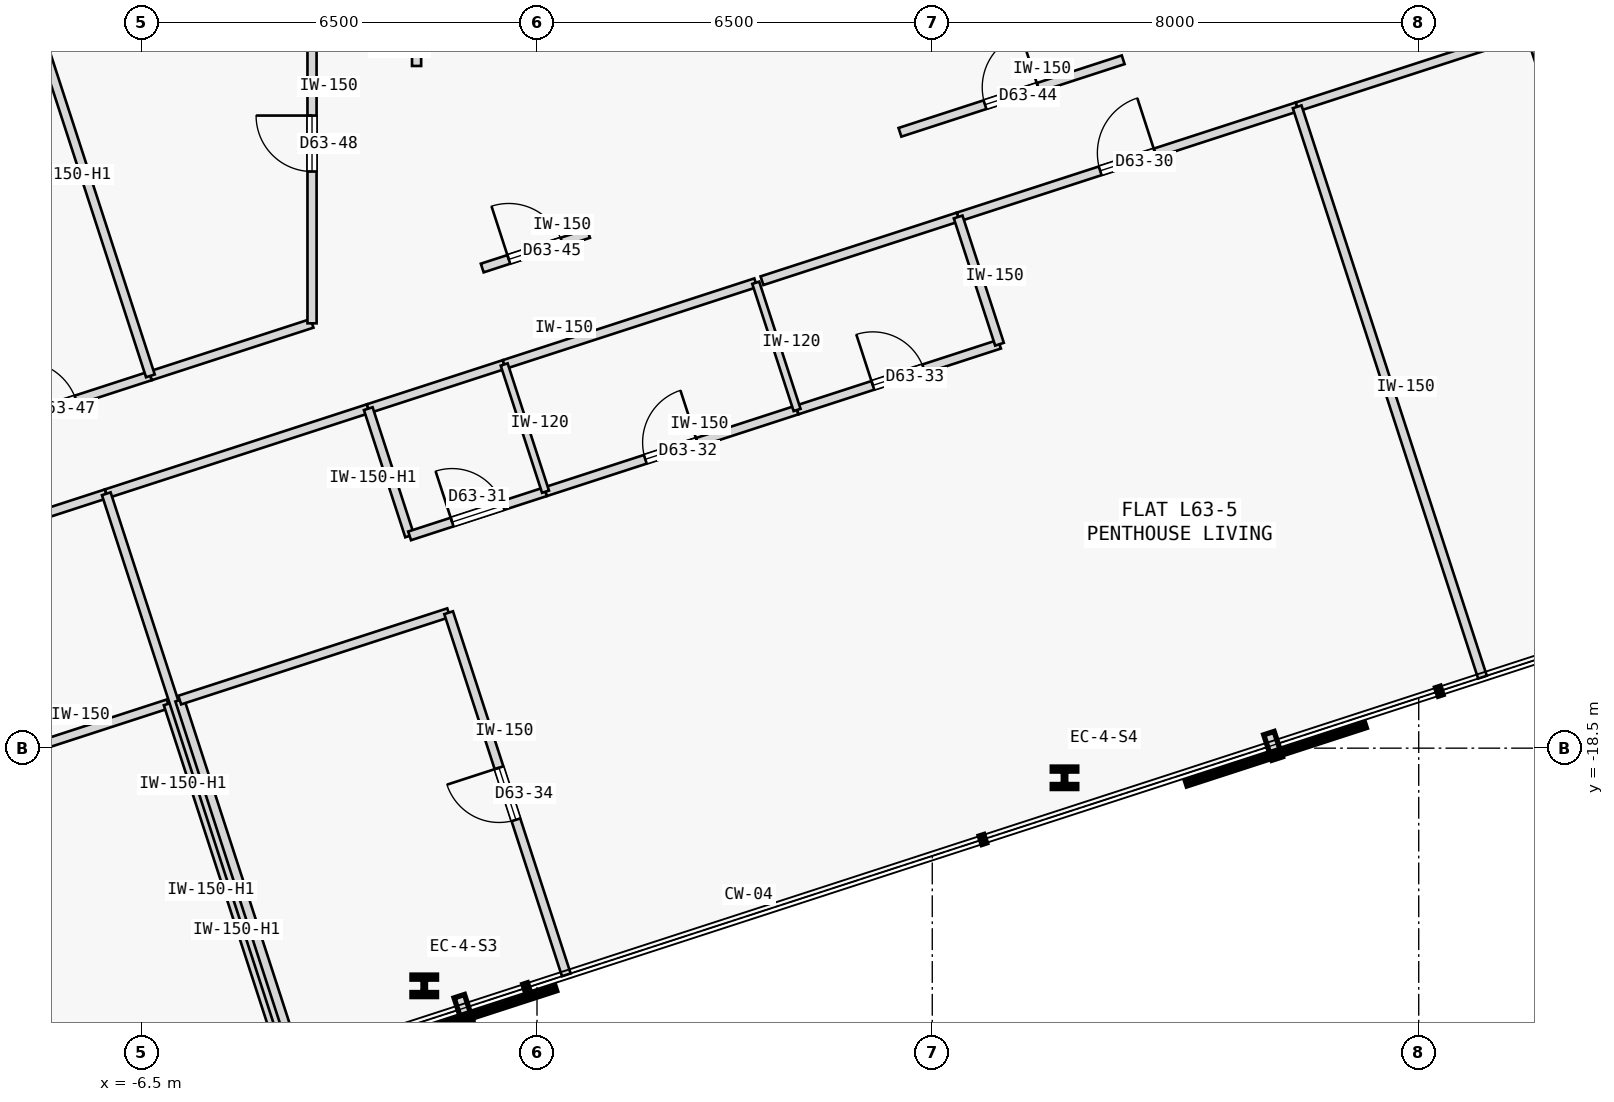
"""IFC4 building model, lengths in metres.
Left out: names, types, materials, properties, quantities, classifications, styles, units other than length and angle.
Written with IfcOpenShell. Run it as: python <this file> out.ifc"""

import sys

from ifc_helpers import new_model, si_unit, direction, frame, frame_2d, origin, origin_2d, place, context, subcontext, project, spatial, rectangle, i_section, extrude, element, fill, save


model = new_model("IFC4")
c1 = context("Model", 3, precision=1e-05, world=origin(), true_north=direction((0.0, 1.0)))
c2 = subcontext(c1, "Body", "Model", "MODEL_VIEW")
j1 = project(units=[si_unit("LENGTHUNIT", "METRE"), si_unit("PLANEANGLEUNIT", "RADIAN")], contexts=[c1])
p1 = place(None, origin())
s1 = spatial("IfcSite", under=j1, at=p1, CompositionType="ELEMENT")
p2 = place(p1, origin())
s2 = spatial("IfcBuilding", under=s1, at=p2, CompositionType="ELEMENT")
p3 = place(p2, frame((0.0, 0.0, 237.7)))
s3 = spatial("IfcBuildingStorey", under=s2, at=p3, CompositionType="ELEMENT", Elevation=237.7)
for number, where, z_axis, x_axis in (
    (1, (-1.854, -22.409, 0.0), (0.0, 0.0, 1.0), (1.0, 0.0, 0.0)),
    (2, (8.675, -18.988, 0.0), (0.0, 0.0, 1.0), (1.0, 0.0, 0.0)),
):
    element("IfcColumn", number, at=place(p3, frame(where, z_axis=z_axis, x_axis=x_axis)), inside=s3, PredefinedType="COLUMN", context=c2, shape_type="SweptSolid", body=[
        extrude(i_section(OverallWidth=0.405, OverallDepth=0.355, WebThickness=0.042, FlangeThickness=0.068, FilletRadius=0.015, at=origin_2d()), origin(), (0.0, 0.0, 1.0), 3.35),
    ])
p4 = place(p3, frame((-14.349, -16.677, 0.0), z_axis=(0.0, 0.0, 1.0), x_axis=(0.951058958043, 0.309009479345, 0.0)))
e3 = element("IfcWall", 3, at=p4, inside=s3, PredefinedType="PARTITIONING", context=c2, shape_type="SweptSolid", body=[
    extrude(rectangle(XDim=7.64, YDim=0.15, at=frame_2d((3.82, 0.0))), origin(), (0.0, 0.0, 1.0), 3.125),
])
p5 = place(p4, frame((3.345, 0.0, 0.0)))
e4 = element("IfcOpeningElement", 4, at=p5, cuts=e3, PredefinedType="OPENING", context=c2, shape_type="SweptSolid", body=[
    extrude(rectangle(XDim=0.95, YDim=2.15, at=frame_2d((0.475, 1.075))), frame((0.0, 0.085, 0.0), z_axis=(0.0, -1.0, 0.0), x_axis=(1.0, 0.0, 0.0)), (0.0, 0.0, 1.0), 0.17),
])
p6 = place(p3, frame((-7.083, -14.316, 0.0), z_axis=(0.0, 0.0, 1.0), x_axis=(0.951054265246, 0.309023922305, 0.0)))
e5 = element("IfcWall", 5, at=p6, inside=s3, PredefinedType="PARTITIONING", context=c2, shape_type="SweptSolid", body=[
    extrude(rectangle(XDim=4.53, YDim=0.15, at=frame_2d((2.265, 0.0))), origin(), (0.0, 0.0, 1.0), 3.125),
])
p7 = place(p3, frame((6.926, -9.765, 0.0), z_axis=(0.0, 0.0, 1.0), x_axis=(0.951054878391, 0.30902203528, 0.0)))
e6 = element("IfcWall", 6, at=p7, inside=s3, PredefinedType="PARTITIONING", context=c2, shape_type="SweptSolid", body=[
    extrude(rectangle(XDim=5.862, YDim=0.15, at=frame_2d((2.931, 0.0))), origin(), (0.0, 0.0, 1.0), 3.125),
])
p8 = place(p7, frame((2.456, 0.0, 0.0)))
e7 = element("IfcOpeningElement", 7, at=p8, cuts=e6, PredefinedType="OPENING", context=c2, shape_type="SweptSolid", body=[
    extrude(rectangle(XDim=0.95, YDim=2.15, at=frame_2d((0.475, 1.075))), frame((0.0, 0.085, 0.0), z_axis=(0.0, -1.0, 0.0), x_axis=(1.0, 0.0, 0.0)), (0.0, 0.0, 1.0), 0.17),
])
p9 = place(p3, frame((-2.775, -12.917, 0.0), z_axis=(0.0, 0.0, 1.0), x_axis=(0.951066131077, 0.308987401554, 0.0)))
e8 = element("IfcWall", 8, at=p9, inside=s3, PredefinedType="PARTITIONING", context=c2, shape_type="SweptSolid", body=[
    extrude(rectangle(XDim=2.35, YDim=0.15, at=frame_2d((1.175, 0.0))), origin(), (0.0, 0.0, 1.0), 3.125),
])
p10 = place(p3, frame((-0.54, -12.19, 0.0), z_axis=(0.0, 0.0, 1.0), x_axis=(0.951057987102, 0.309012467661, 0.0)))
e9 = element("IfcWall", 9, at=p10, inside=s3, PredefinedType="PARTITIONING", context=c2, shape_type="SweptSolid", body=[
    extrude(rectangle(XDim=4.35, YDim=0.15, at=frame_2d((2.175, 0.0))), origin(), (0.0, 0.0, 1.0), 3.125),
])
p11 = place(p3, frame((3.7, -10.813, 0.0), z_axis=(0.0, 0.0, 1.0), x_axis=(0.95106685659, 0.308985168408, 0.0)))
e10 = element("IfcWall", 10, at=p11, inside=s3, PredefinedType="PARTITIONING", context=c2, shape_type="SweptSolid", body=[
    extrude(rectangle(XDim=3.392, YDim=0.15, at=frame_2d((1.696, 0.0))), origin(), (0.0, 0.0, 1.0), 3.125),
])
p12 = place(p3, frame((12.501, -7.953, 0.0), z_axis=(0.0, 0.0, 1.0), x_axis=(0.951046103464, 0.309049039936, 0.0)))
e11 = element("IfcWall", 11, at=p12, inside=s3, PredefinedType="PARTITIONING", context=c2, shape_type="SweptSolid", body=[
    extrude(rectangle(XDim=4.025, YDim=0.15, at=frame_2d((2.012, 0.0))), origin(), (0.0, 0.0, 1.0), 3.125),
])
p13 = place(p3, frame((5.969, -8.372, 0.0), z_axis=(0.0, 0.0, 1.0), x_axis=(0.951053123415, 0.309027436391, 0.0)))
e12 = element("IfcWall", 12, at=p13, inside=s3, PredefinedType="PARTITIONING", context=c2, shape_type="SweptSolid", body=[
    extrude(rectangle(XDim=3.86, YDim=0.15, at=frame_2d((1.93, 0.0))), origin(), (0.0, 0.0, 1.0), 3.125),
])
p14 = place(p13, frame((1.47, 0.0, 0.0)))
e13 = element("IfcOpeningElement", 13, at=p14, cuts=e12, PredefinedType="OPENING", context=c2, shape_type="SweptSolid", body=[
    extrude(rectangle(XDim=0.92, YDim=2.15, at=frame_2d((0.46, 1.075))), frame((0.0, 0.085, 0.0), z_axis=(0.0, -1.0, 0.0), x_axis=(1.0, 0.0, 0.0)), (0.0, 0.0, 1.0), 0.17),
])
p15 = place(p3, frame((-0.901, -10.604, 0.0), z_axis=(0.0, 0.0, 1.0), x_axis=(0.951085784807, 0.308926900637, 0.0)))
e14 = element("IfcWall", 14, at=p15, inside=s3, PredefinedType="PARTITIONING", context=c2, shape_type="SweptSolid", body=[
    extrude(rectangle(XDim=1.838, YDim=0.15, at=frame_2d((0.919, 0.0))), origin(), (0.0, 0.0, 1.0), 3.125),
])
p16 = place(p15, frame((0.459, 0.0, 0.0)))
e15 = element("IfcOpeningElement", 15, at=p16, cuts=e14, PredefinedType="OPENING", context=c2, shape_type="SweptSolid", body=[
    extrude(rectangle(XDim=0.92, YDim=2.15, at=frame_2d((0.46, 1.075))), frame((0.0, 0.085, 0.0), z_axis=(0.0, -1.0, 0.0), x_axis=(1.0, 0.0, 0.0)), (0.0, 0.0, 1.0), 0.17),
])
p17 = place(p3, frame((-1.98, -7.281, 0.0), z_axis=(0.0, 0.0, 1.0), x_axis=(0.000784313484, 0.999999692426, 0.0)))
e16 = element("IfcWall", 16, at=p17, inside=s3, PredefinedType="PARTITIONING", context=c2, shape_type="SweptSolid", body=[
    extrude(rectangle(XDim=0.623, YDim=0.15, at=frame_2d((0.311, 0.0))), origin(), (0.0, 0.0, 1.0), 3.125),
])
p18 = place(p3, frame((-9.679, -13.457, 0.0), z_axis=(0.0, 0.0, 1.0), x_axis=(0.951054104561, 0.309024416831, 0.0)))
e17 = element("IfcWall", 17, at=p18, inside=s3, PredefinedType="PARTITIONING", context=c2, shape_type="SweptSolid", body=[
    extrude(rectangle(XDim=3.492, YDim=0.15, at=frame_2d((1.746, 0.0))), origin(), (0.0, 0.0, 1.0), 3.125),
])
p19 = place(p18, frame((1.286, 0.0, 0.0)))
e18 = element("IfcOpeningElement", 18, at=p19, cuts=e17, PredefinedType="OPENING", context=c2, shape_type="SweptSolid", body=[
    extrude(rectangle(XDim=0.92, YDim=2.15, at=frame_2d((0.46, 1.075))), frame((0.0, 0.085, 0.0), z_axis=(0.0, -1.0, 0.0), x_axis=(1.0, 0.0, 0.0)), (0.0, 0.0, 1.0), 0.17),
])
p20 = place(p3, frame((-6.358, -12.377, 0.0), z_axis=(0.0, 0.0, 1.0), x_axis=(0.951049473261, 0.309038669765, 0.0)))
e19 = element("IfcWall", 19, at=p20, inside=s3, PredefinedType="PARTITIONING", context=c2, shape_type="SweptSolid", body=[
    extrude(rectangle(XDim=2.795, YDim=0.15, at=frame_2d((1.397, 0.0))), origin(), (0.0, 0.0, 1.0), 3.125),
])
p21 = place(p3, frame((-3.7, -11.514, 0.0), z_axis=(0.0, 0.0, 1.0), x_axis=(-8.2572974e-05, 0.999999996591, 0.0)))
e20 = element("IfcWall", 20, at=p21, inside=s3, PredefinedType="PARTITIONING", context=c2, shape_type="SweptSolid", body=[
    extrude(rectangle(XDim=5.913, YDim=0.15, at=frame_2d((2.957, 0.0))), origin(), (0.0, 0.0, 1.0), 3.125),
])
p22 = place(p21, frame((2.497, 0.0, 0.0)))
e21 = element("IfcOpeningElement", 21, at=p22, cuts=e20, PredefinedType="OPENING", context=c2, shape_type="SweptSolid", body=[
    extrude(rectangle(XDim=0.92, YDim=2.15, at=frame_2d((0.46, 1.075))), frame((0.0, 0.085, 0.0), z_axis=(0.0, -1.0, 0.0), x_axis=(1.0, 0.0, 0.0)), (0.0, 0.0, 1.0), 0.17),
])
p23 = place(p3, frame((-10.488, -19.208, 0.0), z_axis=(0.0, 0.0, 1.0), x_axis=(0.951050272606, 0.309036209813, 0.0)))
e22 = element("IfcWall", 22, at=p23, inside=s3, PredefinedType="PARTITIONING", context=c2, shape_type="SweptSolid", body=[
    extrude(rectangle(XDim=4.65, YDim=0.15, at=frame_2d((2.325, 0.0))), origin(), (0.0, 0.0, 1.0), 3.125),
])
p24 = place(p3, frame((-4.131, -23.727, 0.0), z_axis=(0.0, 0.0, 1.0), x_axis=(-0.309013782848, 0.951057559777, 0.0)))
e23 = element("IfcWall", 23, at=p24, inside=s3, PredefinedType="PARTITIONING", context=c2, shape_type="SweptSolid", body=[
    extrude(rectangle(XDim=6.262, YDim=0.15, at=frame_2d((3.131, 0.0))), origin(), (0.0, 0.0, 1.0), 2.675),
])
p25 = place(p3, frame((-4.036, -23.696, 0.0), z_axis=(0.0, 0.0, 1.0), x_axis=(-0.309022258842, 0.95105480575, 0.0)))
e24 = element("IfcWall", 24, at=p25, inside=s3, PredefinedType="PARTITIONING", context=c2, shape_type="SweptSolid", body=[
    extrude(rectangle(XDim=9.862, YDim=0.15, at=frame_2d((4.931, 0.0))), origin(), (0.0, 0.0, 1.0), 2.675),
])
p26 = place(p3, frame((-2.095, -15.009, 0.0), z_axis=(0.0, 0.0, 1.0), x_axis=(-0.308960600764, 0.951074837842, 0.0)))
e25 = element("IfcWall", 25, at=p26, inside=s3, PredefinedType="PARTITIONING", context=c2, shape_type="SweptSolid", body=[
    extrude(rectangle(XDim=2.2, YDim=0.15, at=frame_2d((1.1, 0.0))), origin(), (0.0, 0.0, 1.0), 2.675),
])
p27 = place(p3, frame((-2.095, -15.009, 0.0), z_axis=(0.0, 0.0, 1.0), x_axis=(0.951076048914, 0.308956872689, 0.0)))
e26 = element("IfcWall", 26, at=p27, inside=s3, PredefinedType="PARTITIONING", context=c2, shape_type="SweptSolid", body=[
    extrude(rectangle(XDim=2.35, YDim=0.15, at=frame_2d((1.175, 0.0))), origin(), (0.0, 0.0, 1.0), 3.125),
])
p28 = place(p27, frame((0.735, 0.0, 0.0)))
e27 = element("IfcOpeningElement", 27, at=p28, cuts=e26, PredefinedType="OPENING", context=c2, shape_type="SweptSolid", body=[
    extrude(rectangle(XDim=0.88, YDim=2.15, at=frame_2d((0.44, 1.075))), frame((0.0, 0.085, 0.0), z_axis=(0.0, -1.0, 0.0), x_axis=(1.0, 0.0, 0.0)), (0.0, 0.0, 1.0), 0.17),
])
p29 = place(p3, frame((0.14, -14.283, 0.0), z_axis=(0.0, 0.0, 1.0), x_axis=(0.951057987102, 0.309012467661, 0.0)))
e28 = element("IfcWall", 28, at=p29, inside=s3, PredefinedType="PARTITIONING", context=c2, shape_type="SweptSolid", body=[
    extrude(rectangle(XDim=4.35, YDim=0.15, at=frame_2d((2.175, 0.0))), origin(), (0.0, 0.0, 1.0), 3.125),
])
p30 = place(p29, frame((1.725, 0.0, 0.0)))
e29 = element("IfcOpeningElement", 29, at=p30, cuts=e28, PredefinedType="OPENING", context=c2, shape_type="SweptSolid", body=[
    extrude(rectangle(XDim=0.9, YDim=2.15, at=frame_2d((0.45, 1.075))), frame((0.0, 0.085, 0.0), z_axis=(0.0, -1.0, 0.0), x_axis=(1.0, 0.0, 0.0)), (0.0, 0.0, 1.0), 0.17),
])
p31 = place(p3, frame((4.277, -12.938, 0.0), z_axis=(0.0, 0.0, 1.0), x_axis=(0.951055596592, 0.309019824916, 0.0)))
e30 = element("IfcWall", 30, at=p31, inside=s3, PredefinedType="PARTITIONING", context=c2, shape_type="SweptSolid", body=[
    extrude(rectangle(XDim=3.5, YDim=0.15, at=frame_2d((1.75, 0.0))), origin(), (0.0, 0.0, 1.0), 3.125),
])
p32 = place(p31, frame((1.31, 0.0, 0.0)))
e31 = element("IfcOpeningElement", 31, at=p32, cuts=e30, PredefinedType="OPENING", context=c2, shape_type="SweptSolid", body=[
    extrude(rectangle(XDim=0.88, YDim=2.15, at=frame_2d((0.44, 1.075))), frame((0.0, 0.085, 0.0), z_axis=(0.0, -1.0, 0.0), x_axis=(1.0, 0.0, 0.0)), (0.0, 0.0, 1.0), 0.17),
])
p33 = place(p3, frame((7.606, -11.857, 0.0), z_axis=(0.0, 0.0, 1.0), x_axis=(-0.309060979314, 0.951042223598, 0.0)))
e32 = element("IfcWall", 32, at=p33, inside=s3, PredefinedType="PARTITIONING", context=c2, shape_type="SweptSolid", body=[
    extrude(rectangle(XDim=2.2, YDim=0.15, at=frame_2d((1.1, 0.0))), origin(), (0.0, 0.0, 1.0), 3.125),
])
p34 = place(p3, frame((-3.941, -23.665, 0.0), z_axis=(0.0, 0.0, 1.0), x_axis=(-0.309013782848, 0.951057559777, 0.0)))
e33 = element("IfcWall", 33, at=p34, inside=s3, PredefinedType="PARTITIONING", context=c2, shape_type="SweptSolid", body=[
    extrude(rectangle(XDim=6.262, YDim=0.15, at=frame_2d((3.131, 0.0))), origin(), (0.0, 0.0, 1.0), 2.675),
])
p35 = place(p3, frame((-5.876, -17.709, 0.0), z_axis=(0.0, 0.0, 1.0), x_axis=(0.951065702951, 0.308988719326, 0.0)))
e34 = element("IfcWall", 34, at=p35, inside=s3, PredefinedType="PARTITIONING", context=c2, shape_type="SweptSolid", body=[
    extrude(rectangle(XDim=4.65, YDim=0.15, at=frame_2d((2.325, 0.0))), origin(), (0.0, 0.0, 1.0), 3.125),
])
p36 = place(p3, frame((0.482, -22.228, 0.0), z_axis=(0.0, 0.0, 1.0), x_axis=(-0.30902524124, 0.951053836687, 0.0)))
e35 = element("IfcWall", 35, at=p36, inside=s3, PredefinedType="PARTITIONING", context=c2, shape_type="SweptSolid", body=[
    extrude(rectangle(XDim=6.262, YDim=0.15, at=frame_2d((3.131, 0.0))), origin(), (0.0, 0.0, 1.0), 3.125),
])
p37 = place(p36, frame((2.681, 0.0, 0.0)))
e36 = element("IfcOpeningElement", 36, at=p37, cuts=e35, PredefinedType="OPENING", context=c2, shape_type="SweptSolid", body=[
    extrude(rectangle(XDim=0.9, YDim=2.15, at=frame_2d((0.45, 1.075))), frame((0.0, 0.085, 0.0), z_axis=(0.0, -1.0, 0.0), x_axis=(1.0, 0.0, 0.0)), (0.0, 0.0, 1.0), 0.17),
])
p38 = place(p3, frame((15.548, -17.333, 0.0), z_axis=(0.0, 0.0, 1.0), x_axis=(-0.308999867152, 0.951062081097, 0.0)))
e37 = element("IfcWall", 37, at=p38, inside=s3, PredefinedType="PARTITIONING", context=c2, shape_type="SweptSolid", body=[
    extrude(rectangle(XDim=9.862, YDim=0.15, at=frame_2d((4.931, 0.0))), origin(), (0.0, 0.0, 1.0), 3.125),
])
for number, where, z_axis, x_axis in (
    (38, (0.14, -14.283, 0.0), (0.0, 0.0, 1.0), (-0.309, 0.951, 0.0)),
    (39, (4.277, -12.938, 0.0), (0.0, 0.0, 1.0), (-0.309, 0.951, 0.0)),
):
    element("IfcWall", number, at=place(p3, frame(where, z_axis=z_axis, x_axis=x_axis)), inside=s3, PredefinedType="PARTITIONING", context=c2, shape_type="SweptSolid", body=[
        extrude(rectangle(XDim=2.2, YDim=0.12, at=frame_2d((1.1, 0.0))), origin(), (0.0, 0.0, 1.0), 3.125),
    ])
p39 = place(p3, frame((17.009, -8.802, 0.0), z_axis=(0.0, 0.0, 1.0), x_axis=(-0.309028364152, 0.951052821956, 0.0)))
e40 = element("IfcWall", 40, at=p39, inside=s3, PredefinedType="PARTITIONING", context=c2, shape_type="SweptSolid", body=[
    extrude(rectangle(XDim=2.2, YDim=0.15, at=frame_2d((1.1, 0.0))), origin(), (0.0, 0.0, 1.0), 3.125),
])
p40 = place(p3, frame((-6.358, -12.377, 0.0), z_axis=(0.0, 0.0, 1.0), x_axis=(-0.309024097906, 0.951054208189, 0.0)))
e41 = element("IfcWall", 41, at=p40, inside=s3, PredefinedType="PARTITIONING", context=c2, shape_type="SweptSolid", body=[
    extrude(rectangle(XDim=7.126, YDim=0.15, at=frame_2d((3.563, 0.0))), origin(), (0.0, 0.0, 1.0), 2.675),
])
p41 = place(p8, origin())
e42 = element("IfcDoor", 42, at=p41, inside=s3, OperationType="SINGLE_SWING_RIGHT", PredefinedType="DOOR", context=c2, shape_type="SweptSolid", body=[
    extrude(rectangle(XDim=0.95, YDim=2.15, at=frame_2d((0.475, 1.075))), frame((0.0, 0.025, 0.0), z_axis=(0.0, -1.0, 0.0), x_axis=(1.0, 0.0, 0.0)), (0.0, 0.0, 1.0), 0.05),
])
fill(e7, e42)
p42 = place(p28, origin())
e43 = element("IfcDoor", 43, at=p42, inside=s3, OperationType="SINGLE_SWING_LEFT", PredefinedType="DOOR", context=c2, shape_type="SweptSolid", body=[
    extrude(rectangle(XDim=0.88, YDim=2.15, at=frame_2d((0.44, 1.075))), frame((0.0, 0.025, 0.0), z_axis=(0.0, -1.0, 0.0), x_axis=(1.0, 0.0, 0.0)), (0.0, 0.0, 1.0), 0.05),
])
fill(e27, e43)
p43 = place(p30, origin())
e44 = element("IfcDoor", 44, at=p43, inside=s3, OperationType="SINGLE_SWING_RIGHT", PredefinedType="DOOR", context=c2, shape_type="SweptSolid", body=[
    extrude(rectangle(XDim=0.9, YDim=2.15, at=frame_2d((0.45, 1.075))), frame((0.0, 0.025, 0.0), z_axis=(0.0, -1.0, 0.0), x_axis=(1.0, 0.0, 0.0)), (0.0, 0.0, 1.0), 0.05),
])
fill(e29, e44)
p44 = place(p32, origin())
e45 = element("IfcDoor", 45, at=p44, inside=s3, OperationType="SINGLE_SWING_LEFT", PredefinedType="DOOR", context=c2, shape_type="SweptSolid", body=[
    extrude(rectangle(XDim=0.88, YDim=2.15, at=frame_2d((0.44, 1.075))), frame((0.0, 0.025, 0.0), z_axis=(0.0, -1.0, 0.0), x_axis=(1.0, 0.0, 0.0)), (0.0, 0.0, 1.0), 0.05),
])
fill(e31, e45)
p45 = place(p37, origin())
e46 = element("IfcDoor", 46, at=p45, inside=s3, OperationType="SINGLE_SWING_RIGHT", PredefinedType="DOOR", context=c2, shape_type="SweptSolid", body=[
    extrude(rectangle(XDim=0.9, YDim=2.15, at=frame_2d((0.45, 1.075))), frame((0.0, 0.025, 0.0), z_axis=(0.0, -1.0, 0.0), x_axis=(1.0, 0.0, 0.0)), (0.0, 0.0, 1.0), 0.05),
])
fill(e36, e46)
p46 = place(p14, origin())
e47 = element("IfcDoor", 47, at=p46, inside=s3, OperationType="SINGLE_SWING_RIGHT", PredefinedType="DOOR", context=c2, shape_type="SweptSolid", body=[
    extrude(rectangle(XDim=0.92, YDim=2.15, at=frame_2d((0.46, 1.075))), frame((0.0, 0.025, 0.0), z_axis=(0.0, -1.0, 0.0), x_axis=(1.0, 0.0, 0.0)), (0.0, 0.0, 1.0), 0.05),
])
fill(e13, e47)
p47 = place(p16, origin())
e48 = element("IfcDoor", 48, at=p47, inside=s3, OperationType="SINGLE_SWING_LEFT", PredefinedType="DOOR", context=c2, shape_type="SweptSolid", body=[
    extrude(rectangle(XDim=0.92, YDim=2.15, at=frame_2d((0.46, 1.075))), frame((0.0, 0.025, 0.0), z_axis=(0.0, -1.0, 0.0), x_axis=(1.0, 0.0, 0.0)), (0.0, 0.0, 1.0), 0.05),
])
fill(e15, e48)
p48 = place(p19, origin())
e49 = element("IfcDoor", 49, at=p48, inside=s3, OperationType="SINGLE_SWING_LEFT", PredefinedType="DOOR", context=c2, shape_type="SweptSolid", body=[
    extrude(rectangle(XDim=0.92, YDim=2.15, at=frame_2d((0.46, 1.075))), frame((0.0, 0.025, 0.0), z_axis=(0.0, -1.0, 0.0), x_axis=(1.0, 0.0, 0.0)), (0.0, 0.0, 1.0), 0.05),
])
fill(e18, e49)
p49 = place(p22, origin())
e50 = element("IfcDoor", 50, at=p49, inside=s3, OperationType="SINGLE_SWING_RIGHT", PredefinedType="DOOR", context=c2, shape_type="SweptSolid", body=[
    extrude(rectangle(XDim=0.92, YDim=2.15, at=frame_2d((0.46, 1.075))), frame((0.0, 0.025, 0.0), z_axis=(0.0, -1.0, 0.0), x_axis=(1.0, 0.0, 0.0)), (0.0, 0.0, 1.0), 0.05),
])
fill(e21, e50)
save(model, sys.argv[1])
